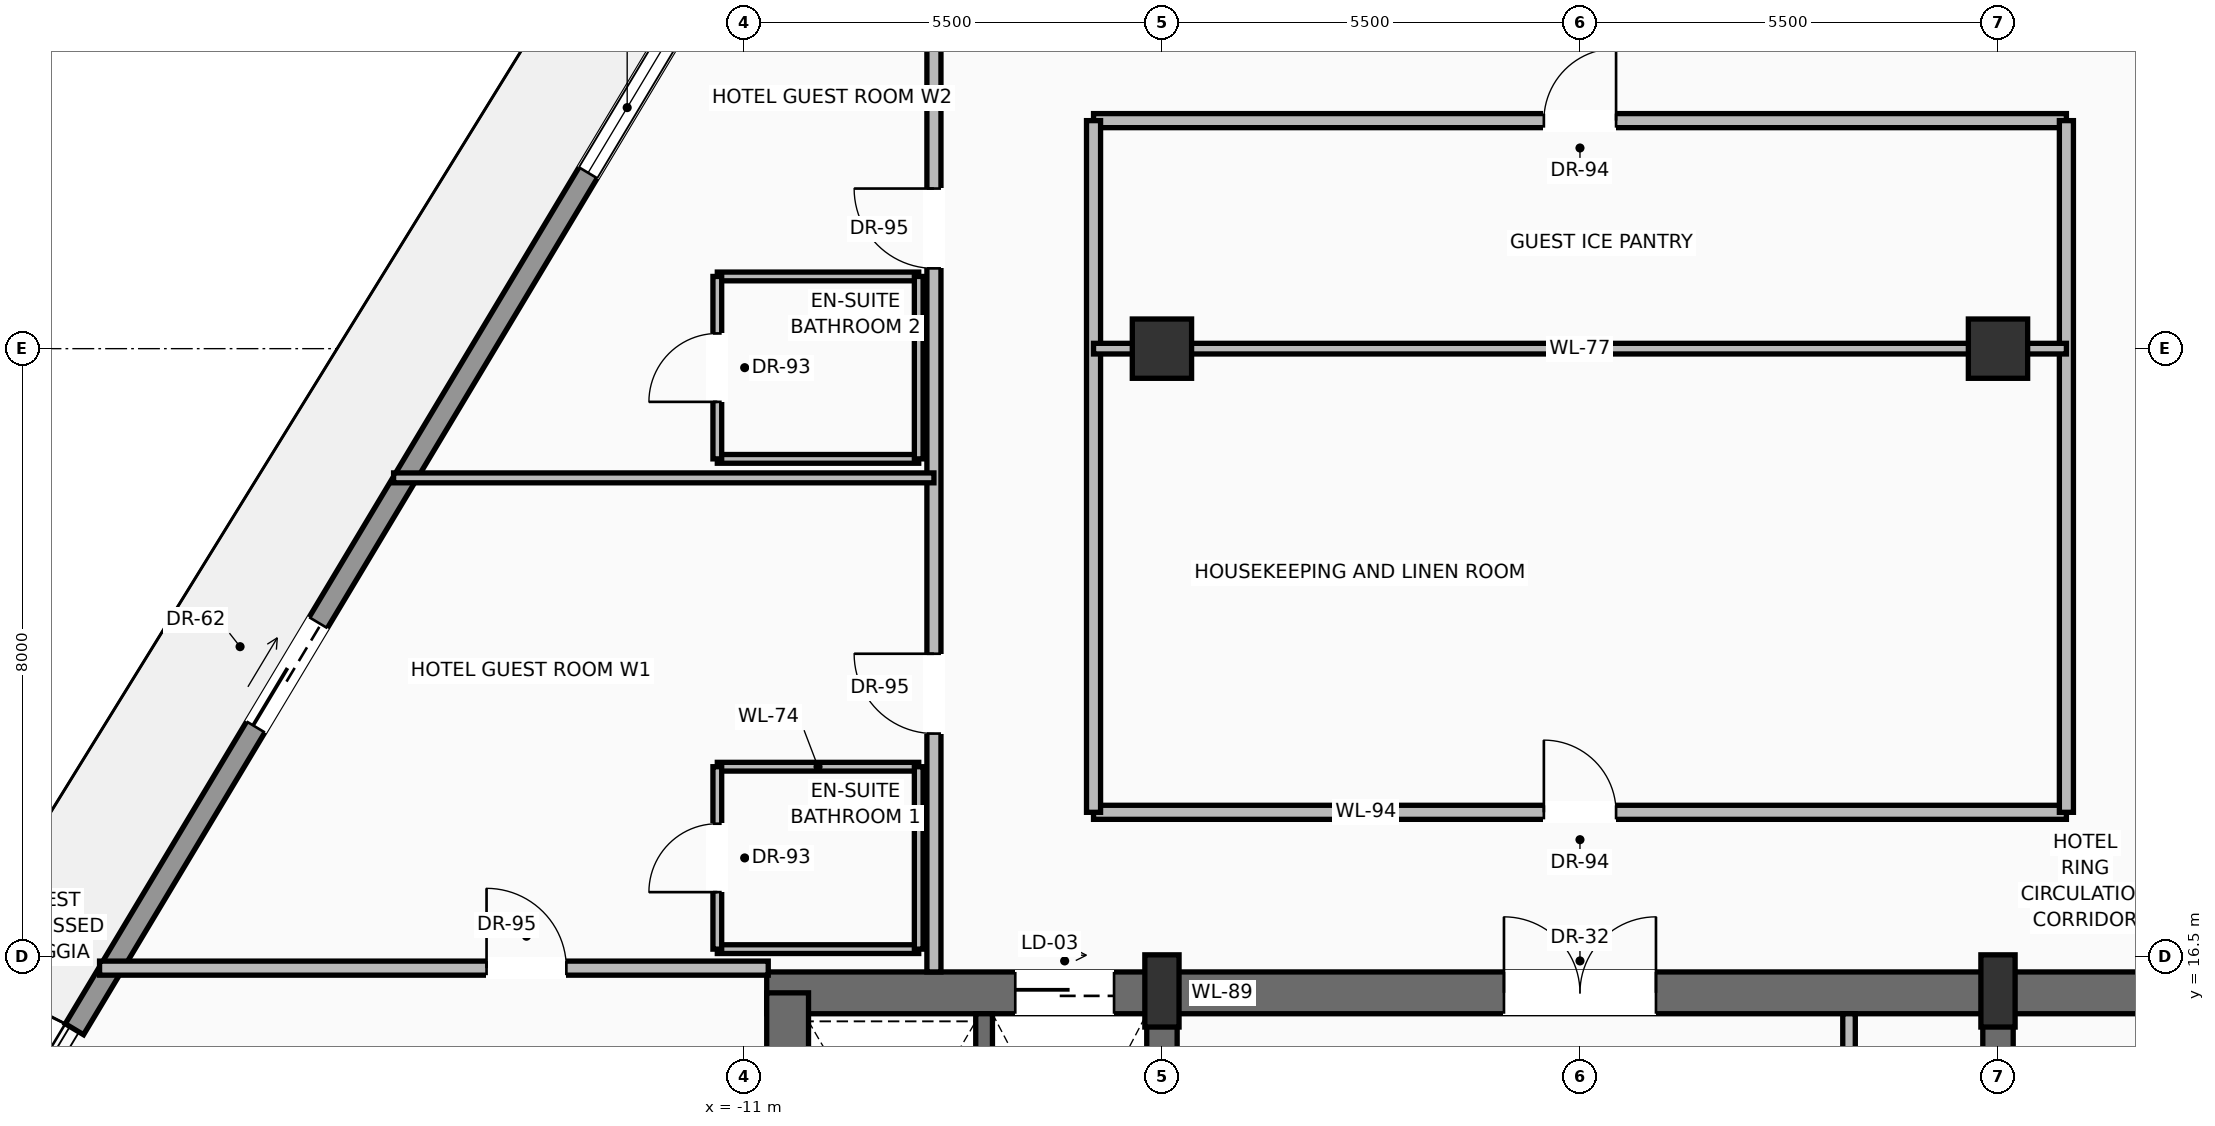
"""IFC4 building model, lengths in metres.
Left out: names, types, materials, properties, quantities, classifications, styles, units other than length and angle.
Written with IfcOpenShell. Run it as: python <this file> out.ifc"""

import sys

from ifc_helpers import new_model, si_unit, direction, frame, frame_2d, origin, origin_2d, place, context, subcontext, project, spatial, rectangle, extrude, source, transform, mapped, element, fill, save


model = new_model("IFC4")
c1 = context("Model", 3, precision=1e-05, world=origin(), true_north=direction((0.0, 1.0)))
c2 = subcontext(c1, "Body", "Model", "MODEL_VIEW")
j1 = project(units=[si_unit("LENGTHUNIT", "METRE"), si_unit("PLANEANGLEUNIT", "RADIAN")], contexts=[c1])
p1 = place(None, origin())
s1 = spatial("IfcSite", under=j1, at=p1, CompositionType="ELEMENT")
p2 = place(p1, origin())
s2 = spatial("IfcBuilding", under=s1, at=p2, CompositionType="ELEMENT")
p3 = place(p2, frame((0.0, 0.0, 220.0)))
s3 = spatial("IfcBuildingStorey", under=s2, at=p3, CompositionType="ELEMENT", Elevation=220.0)
p4 = place(p3, frame((-10.7, 16.025, 0.0), z_axis=(0.0, 0.0, 1.0), x_axis=(1.0, 0.0, 0.0)))
e1 = element("IfcWall", 1, at=p4, inside=s3, PredefinedType="SHEAR", context=c2, shape_type="SweptSolid", body=[
    extrude(rectangle(XDim=21.4, YDim=0.55, at=frame_2d((10.7, 0.0))), origin(), (0.0, 0.0, 1.0), 3.24),
])
p5 = place(p4, frame((3.27, 0.0, 0.0)))
e2 = element("IfcOpeningElement", 2, at=p5, cuts=e1, PredefinedType="OPENING", context=c2, shape_type="SweptSolid", body=[
    extrude(rectangle(XDim=1.3, YDim=2.3, at=frame_2d((0.65, 1.15))), frame((0.0, 0.285, 0.0), z_axis=(0.0, -1.0, 0.0), x_axis=(1.0, 0.0, 0.0)), (0.0, 0.0, 1.0), 0.57),
])
p6 = place(p4, frame((9.7, 0.0, 0.0)))
e3 = element("IfcOpeningElement", 3, at=p6, cuts=e1, PredefinedType="OPENING", context=c2, shape_type="SweptSolid", body=[
    extrude(rectangle(XDim=2.0, YDim=2.4, at=frame_2d((1.0, 1.2))), frame((0.0, 0.285, 0.0), z_axis=(0.0, -1.0, 0.0), x_axis=(1.0, 0.0, 0.0)), (0.0, 0.0, 1.0), 0.57),
])
p7 = place(p3, frame((-10.425, 0.575, 0.0), z_axis=(0.0, 0.0, 1.0), x_axis=(0.0, 1.0, 0.0)))
e4 = element("IfcWall", 4, at=p7, inside=s3, PredefinedType="SHEAR", context=c2, shape_type="SweptSolid", body=[
    extrude(rectangle(XDim=15.45, YDim=0.55, at=frame_2d((7.725, 0.0))), origin(), (0.0, 0.0, 1.0), 3.24),
])
p8 = place(p3, frame((-5.5, 0.575, 0.0), z_axis=(0.0, 0.0, 1.0), x_axis=(0.0, 1.0, 0.0)))
e5 = element("IfcWall", 5, at=p8, inside=s3, PredefinedType="SHEAR", context=c2, shape_type="SweptSolid", body=[
    extrude(rectangle(XDim=15.45, YDim=0.4, at=frame_2d((7.725, 0.0))), origin(), (0.0, 0.0, 1.0), 3.24),
])
p9 = place(p8, frame((8.925, 0.0, 0.0)))
e6 = element("IfcOpeningElement", 6, at=p9, cuts=e5, PredefinedType="OPENING", context=c2, shape_type="SweptSolid", body=[
    extrude(rectangle(XDim=1.1, YDim=2.2, at=frame_2d((0.55, 1.1))), frame((0.0, 0.21, 0.0), z_axis=(0.0, -1.0, 0.0), x_axis=(1.0, 0.0, 0.0)), (0.0, 0.0, 1.0), 0.42),
])
p10 = place(p3, frame((5.5, 0.575, 0.0), z_axis=(0.0, 0.0, 1.0), x_axis=(0.0, 1.0, 0.0)))
e7 = element("IfcWall", 7, at=p10, inside=s3, PredefinedType="SHEAR", context=c2, shape_type="SweptSolid", body=[
    extrude(rectangle(XDim=15.45, YDim=0.4, at=frame_2d((7.725, 0.0))), origin(), (0.0, 0.0, 1.0), 3.24),
])
p11 = place(p10, frame((8.925, 0.0, 0.0)))
e8 = element("IfcOpeningElement", 8, at=p11, cuts=e7, PredefinedType="OPENING", context=c2, shape_type="SweptSolid", body=[
    extrude(rectangle(XDim=1.1, YDim=2.2, at=frame_2d((0.55, 1.1))), frame((0.0, 0.21, 0.0), z_axis=(0.0, -1.0, 0.0), x_axis=(1.0, 0.0, 0.0)), (0.0, 0.0, 1.0), 0.42),
])
m1 = source(origin(), c2, "Body", "SweptSolid", [
    extrude(rectangle(XDim=0.45, YDim=0.95, at=origin_2d()), origin(), (0.0, 0.0, 1.0), 3.45),
])
for number, where, z_axis, x_axis in (
    (9, (-5.5, 16.05, 0.0), (0.0, 0.0, 1.0), (1.0, 0.0, 0.0)),
    (10, (5.5, 16.05, 0.0), (0.0, 0.0, 1.0), (1.0, 0.0, 0.0)),
):
    element("IfcColumn", number, at=place(p3, frame(where, z_axis=z_axis, x_axis=x_axis)), inside=s3, PredefinedType="PILASTER", context=c2, shape_type="MappedRepresentation", body=[
        mapped(m1, transform((0.0, 0.0, 0.0), scale=1.0)),
    ])
m2 = source(origin(), c2, "Body", "SweptSolid", [
    extrude(rectangle(XDim=0.78, YDim=0.78, at=origin_2d()), origin(), (0.0, 0.0, 1.0), 3.45),
])
for number, where, z_axis, x_axis in (
    (11, (-5.5, 24.5, 0.0), (0.0, 0.0, 1.0), (1.0, 0.0, 0.0)),
    (12, (5.5, 24.5, 0.0), (0.0, 0.0, 1.0), (1.0, 0.0, 0.0)),
):
    element("IfcColumn", number, at=place(p3, frame(where, z_axis=z_axis, x_axis=x_axis)), inside=s3, PredefinedType="COLUMN", context=c2, shape_type="MappedRepresentation", body=[
        mapped(m2, transform((0.0, 0.0, 0.0), scale=1.0)),
    ])
p12 = place(p3, frame((-19.808, 15.546, 0.0), z_axis=(0.0, 0.0, 1.0), x_axis=(0.514354531287, 0.857577644382, 0.0)))
e13 = element("IfcWall", 13, at=p12, inside=s3, PredefinedType="SOLIDWALL", context=c2, shape_type="SweptSolid", body=[
    extrude(rectangle(XDim=19.322, YDim=0.28, at=frame_2d((9.661, 0.0))), origin(), (0.0, 0.0, 1.0), 2.82),
])
p13 = place(p12, frame((4.637, 0.0, 0.0)))
e14 = element("IfcOpeningElement", 14, at=p13, cuts=e13, PredefinedType="OPENING", context=c2, shape_type="SweptSolid", body=[
    extrude(rectangle(XDim=1.6, YDim=2.35, at=frame_2d((0.8, 1.175))), frame((0.0, 0.15, 0.0), z_axis=(0.0, -1.0, 0.0), x_axis=(1.0, 0.0, 0.0)), (0.0, 0.0, 1.0), 0.3),
])
p14 = place(p12, frame((13.139, 0.0, 0.9)))
e15 = element("IfcOpeningElement", 15, at=p14, cuts=e13, PredefinedType="OPENING", context=c2, shape_type="SweptSolid", body=[
    extrude(rectangle(XDim=2.0, YDim=1.75, at=frame_2d((1.0, 0.875))), frame((0.0, 0.15, 0.0), z_axis=(0.0, -1.0, 0.0), x_axis=(1.0, 0.0, 0.0)), (0.0, 0.0, 1.0), 0.3),
])
p15 = place(p3, frame((-7.84, 11.87, 0.0), z_axis=(0.0, 0.0, 1.0), x_axis=(0.0, 1.0, 0.0)))
e16 = element("IfcWall", 16, at=p15, inside=s3, PredefinedType="SOLIDWALL", context=c2, shape_type="SweptSolid", body=[
    extrude(rectangle(XDim=3.88, YDim=0.22, at=frame_2d((1.94, 0.0))), origin(), (0.0, 0.0, 1.0), 3.24),
])
p16 = place(p3, frame((3.54, 11.22, 0.0), z_axis=(0.0, 0.0, 1.0), x_axis=(0.0, 1.0, 0.0)))
e17 = element("IfcWall", 17, at=p16, inside=s3, PredefinedType="PARTITIONING", context=c2, shape_type="SweptSolid", body=[
    extrude(rectangle(XDim=4.53, YDim=0.165, at=frame_2d((2.265, 0.0))), origin(), (0.0, 0.0, 1.0), 3.232),
])
p17 = place(p16, frame((1.25, 0.0, 0.0)))
e18 = element("IfcOpeningElement", 18, at=p17, cuts=e17, PredefinedType="OPENING", context=c2, shape_type="SweptSolid", body=[
    extrude(rectangle(XDim=0.9, YDim=2.1, at=frame_2d((0.45, 1.05))), frame((0.0, 0.093, 0.0), z_axis=(0.0, -1.0, 0.0), x_axis=(1.0, 0.0, 0.0)), (0.0, 0.0, 1.0), 0.185),
])
p18 = place(p3, frame((-6.4, 18.4, 0.0), z_axis=(0.0, 0.0, 1.0), x_axis=(1.0, 0.0, 0.0)))
e19 = element("IfcWall", 19, at=p18, inside=s3, PredefinedType="PARTITIONING", context=c2, shape_type="SweptSolid", body=[
    extrude(rectangle(XDim=12.8, YDim=0.185, at=frame_2d((6.4, 0.0))), origin(), (0.0, 0.0, 1.0), 3.232),
])
p19 = place(p18, frame((5.925, 0.0, 0.0)))
e20 = element("IfcOpeningElement", 20, at=p19, cuts=e19, PredefinedType="OPENING", context=c2, shape_type="SweptSolid", body=[
    extrude(rectangle(XDim=0.95, YDim=2.2, at=frame_2d((0.475, 1.1))), frame((0.0, 0.103, 0.0), z_axis=(0.0, -1.0, 0.0), x_axis=(1.0, 0.0, 0.0)), (0.0, 0.0, 1.0), 0.205),
])
p20 = place(p3, frame((-6.4, 27.5, 0.0), z_axis=(0.0, 0.0, 1.0), x_axis=(1.0, 0.0, 0.0)))
e21 = element("IfcWall", 21, at=p20, inside=s3, PredefinedType="PARTITIONING", context=c2, shape_type="SweptSolid", body=[
    extrude(rectangle(XDim=12.8, YDim=0.185, at=frame_2d((6.4, 0.0))), origin(), (0.0, 0.0, 1.0), 3.232),
])
p21 = place(p20, frame((5.925, 0.0, 0.0)))
e22 = element("IfcOpeningElement", 22, at=p21, cuts=e21, PredefinedType="OPENING", context=c2, shape_type="SweptSolid", body=[
    extrude(rectangle(XDim=0.95, YDim=2.2, at=frame_2d((0.475, 1.1))), frame((0.0, 0.103, 0.0), z_axis=(0.0, -1.0, 0.0), x_axis=(1.0, 0.0, 0.0)), (0.0, 0.0, 1.0), 0.205),
])
for number, where, z_axis, x_axis in (
    (23, (-6.4, 18.4, 0.0), (0.0, 0.0, 1.0), (0.0, 1.0, 0.0)),
    (24, (6.4, 18.4, 0.0), (0.0, 0.0, 1.0), (0.0, 1.0, 0.0)),
):
    element("IfcWall", number, at=place(p3, frame(where, z_axis=z_axis, x_axis=x_axis)), inside=s3, PredefinedType="PARTITIONING", context=c2, shape_type="SweptSolid", body=[
        extrude(rectangle(XDim=9.1, YDim=0.185, at=frame_2d((4.55, 0.0))), origin(), (0.0, 0.0, 1.0), 3.232),
    ])
p22 = place(p3, frame((-8.5, 16.3, 0.0), z_axis=(0.0, 0.0, 1.0), x_axis=(0.0, 1.0, 0.0)))
e25 = element("IfcWall", 25, at=p22, inside=s3, PredefinedType="PARTITIONING", context=c2, shape_type="SweptSolid", body=[
    extrude(rectangle(XDim=13.3, YDim=0.185, at=frame_2d((6.65, 0.0))), origin(), (0.0, 0.0, 1.0), 3.232),
])
p23 = place(p22, frame((3.136, 0.0, 0.0)))
e26 = element("IfcOpeningElement", 26, at=p23, cuts=e25, PredefinedType="OPENING", context=c2, shape_type="SweptSolid", body=[
    extrude(rectangle(XDim=1.05, YDim=2.25, at=frame_2d((0.525, 1.125))), frame((0.0, 0.103, 0.0), z_axis=(0.0, -1.0, 0.0), x_axis=(1.0, 0.0, 0.0)), (0.0, 0.0, 1.0), 0.205),
])
p24 = place(p22, frame((9.256, 0.0, 0.0)))
e27 = element("IfcOpeningElement", 27, at=p24, cuts=e25, PredefinedType="OPENING", context=c2, shape_type="SweptSolid", body=[
    extrude(rectangle(XDim=1.05, YDim=2.25, at=frame_2d((0.525, 1.125))), frame((0.0, 0.103, 0.0), z_axis=(0.0, -1.0, 0.0), x_axis=(1.0, 0.0, 0.0)), (0.0, 0.0, 1.0), 0.205),
])
p25 = place(p3, frame((-6.4, 24.5, 0.0), z_axis=(0.0, 0.0, 1.0), x_axis=(1.0, 0.0, 0.0)))
e28 = element("IfcWall", 28, at=p25, inside=s3, PredefinedType="PARTITIONING", context=c2, shape_type="SweptSolid", body=[
    extrude(rectangle(XDim=12.8, YDim=0.14, at=frame_2d((6.4, 0.0))), origin(), (0.0, 0.0, 1.0), 2.683),
])
p26 = place(p3, frame((-19.478, 16.35, 0.0), z_axis=(0.0, 0.0, 1.0), x_axis=(1.0, 0.0, 0.0)))
e29 = element("IfcWall", 29, at=p26, inside=s3, PredefinedType="PARTITIONING", context=c2, shape_type="SweptSolid", body=[
    extrude(rectangle(XDim=8.798, YDim=0.185, at=frame_2d((4.399, 0.0))), origin(), (0.0, 0.0, 1.0), 3.232),
])
p27 = place(p26, frame((5.092, 0.0, 0.0)))
e30 = element("IfcOpeningElement", 30, at=p27, cuts=e29, PredefinedType="OPENING", context=c2, shape_type="SweptSolid", body=[
    extrude(rectangle(XDim=1.05, YDim=2.25, at=frame_2d((0.525, 1.125))), frame((0.0, 0.103, 0.0), z_axis=(0.0, -1.0, 0.0), x_axis=(1.0, 0.0, 0.0)), (0.0, 0.0, 1.0), 0.205),
])
for number, where, z_axis, x_axis in (
    (31, (-11.35, 16.6, 0.0), (0.0, 0.0, 1.0), (1.0, 0.0, 0.0)),
    (32, (-11.35, 19.0, 0.0), (0.0, 0.0, 1.0), (1.0, 0.0, 0.0)),
):
    element("IfcWall", number, at=place(p3, frame(where, z_axis=z_axis, x_axis=x_axis)), inside=s3, PredefinedType="PARTITIONING", context=c2, shape_type="SweptSolid", body=[
        extrude(rectangle(XDim=2.65, YDim=0.115, at=frame_2d((1.325, 0.0))), origin(), (0.0, 0.0, 1.0), 3.232),
    ])
p28 = place(p3, frame((-11.35, 16.6, 0.0), z_axis=(0.0, 0.0, 1.0), x_axis=(0.0, 1.0, 0.0)))
e33 = element("IfcWall", 33, at=p28, inside=s3, PredefinedType="PARTITIONING", context=c2, shape_type="SweptSolid", body=[
    extrude(rectangle(XDim=2.4, YDim=0.115, at=frame_2d((1.2, 0.0))), origin(), (0.0, 0.0, 1.0), 3.232),
])
p29 = place(p28, frame((0.75, 0.0, 0.0)))
e34 = element("IfcOpeningElement", 34, at=p29, cuts=e33, PredefinedType="OPENING", context=c2, shape_type="SweptSolid", body=[
    extrude(rectangle(XDim=0.9, YDim=2.15, at=frame_2d((0.45, 1.075))), frame((0.0, 0.067, 0.0), z_axis=(0.0, -1.0, 0.0), x_axis=(1.0, 0.0, 0.0)), (0.0, 0.0, 1.0), 0.135),
])
p30 = place(p3, frame((-8.7, 16.6, 0.0), z_axis=(0.0, 0.0, 1.0), x_axis=(0.0, 1.0, 0.0)))
e35 = element("IfcWall", 35, at=p30, inside=s3, PredefinedType="PARTITIONING", context=c2, shape_type="SweptSolid", body=[
    extrude(rectangle(XDim=2.4, YDim=0.115, at=frame_2d((1.2, 0.0))), origin(), (0.0, 0.0, 1.0), 3.232),
])
p31 = place(p3, frame((-15.609, 22.8, 0.0), z_axis=(0.0, 0.0, 1.0), x_axis=(1.0, 0.0, 0.0)))
e36 = element("IfcWall", 36, at=p31, inside=s3, PredefinedType="PARTITIONING", context=c2, shape_type="SweptSolid", body=[
    extrude(rectangle(XDim=7.109, YDim=0.13, at=frame_2d((3.555, 0.0))), origin(), (0.0, 0.0, 1.0), 3.232),
])
for number, where, z_axis, x_axis in (
    (37, (-11.35, 23.05, 0.0), (0.0, 0.0, 1.0), (1.0, 0.0, 0.0)),
    (38, (-11.35, 25.45, 0.0), (0.0, 0.0, 1.0), (1.0, 0.0, 0.0)),
):
    element("IfcWall", number, at=place(p3, frame(where, z_axis=z_axis, x_axis=x_axis)), inside=s3, PredefinedType="PARTITIONING", context=c2, shape_type="SweptSolid", body=[
        extrude(rectangle(XDim=2.65, YDim=0.115, at=frame_2d((1.325, 0.0))), origin(), (0.0, 0.0, 1.0), 3.232),
    ])
p32 = place(p3, frame((-11.35, 23.05, 0.0), z_axis=(0.0, 0.0, 1.0), x_axis=(0.0, 1.0, 0.0)))
e39 = element("IfcWall", 39, at=p32, inside=s3, PredefinedType="PARTITIONING", context=c2, shape_type="SweptSolid", body=[
    extrude(rectangle(XDim=2.4, YDim=0.115, at=frame_2d((1.2, 0.0))), origin(), (0.0, 0.0, 1.0), 3.232),
])
p33 = place(p32, frame((0.75, 0.0, 0.0)))
e40 = element("IfcOpeningElement", 40, at=p33, cuts=e39, PredefinedType="OPENING", context=c2, shape_type="SweptSolid", body=[
    extrude(rectangle(XDim=0.9, YDim=2.15, at=frame_2d((0.45, 1.075))), frame((0.0, 0.067, 0.0), z_axis=(0.0, -1.0, 0.0), x_axis=(1.0, 0.0, 0.0)), (0.0, 0.0, 1.0), 0.135),
])
p34 = place(p3, frame((-8.7, 23.05, 0.0), z_axis=(0.0, 0.0, 1.0), x_axis=(0.0, 1.0, 0.0)))
e41 = element("IfcWall", 41, at=p34, inside=s3, PredefinedType="PARTITIONING", context=c2, shape_type="SweptSolid", body=[
    extrude(rectangle(XDim=2.4, YDim=0.115, at=frame_2d((1.2, 0.0))), origin(), (0.0, 0.0, 1.0), 3.232),
])
m3 = source(origin(), c2, "Body", "SweptSolid", [
    extrude(rectangle(XDim=1.6, YDim=2.35, at=frame_2d((0.8, 1.175))), frame((0.0, 0.025, 0.0), z_axis=(0.0, -1.0, 0.0), x_axis=(1.0, 0.0, 0.0)), (0.0, 0.0, 1.0), 0.05),
])
p35 = place(p13, origin())
e42 = element("IfcDoor", 42, at=p35, inside=s3, OperationType="SLIDING_TO_LEFT", PredefinedType="DOOR", context=c2, shape_type="MappedRepresentation", body=[
    mapped(m3, transform((0.0, 0.0, 0.0), scale=1.0)),
])
fill(e14, e42)
m4 = source(origin(), c2, "Body", "SweptSolid", [
    extrude(rectangle(XDim=2.0, YDim=1.75, at=frame_2d((1.0, 0.875))), frame((0.0, 0.03, 0.0), z_axis=(0.0, -1.0, 0.0), x_axis=(1.0, 0.0, 0.0)), (0.0, 0.0, 1.0), 0.06),
])
p36 = place(p14, origin())
e43 = element("IfcWindow", 43, at=p36, inside=s3, PartitioningType="SINGLE_PANEL", PredefinedType="WINDOW", context=c2, shape_type="MappedRepresentation", body=[
    mapped(m4, transform((0.0, 0.0, 0.0), scale=1.0)),
])
fill(e15, e43)
m5 = source(origin(), c2, "Body", "SweptSolid", [
    extrude(rectangle(XDim=1.3, YDim=2.3, at=frame_2d((0.65, 1.15))), frame((0.0, 0.025, 0.0), z_axis=(0.0, -1.0, 0.0), x_axis=(1.0, 0.0, 0.0)), (0.0, 0.0, 1.0), 0.05),
])
p37 = place(p5, origin())
e44 = element("IfcDoor", 44, at=p37, inside=s3, OperationType="SLIDING_TO_RIGHT", PredefinedType="DOOR", context=c2, shape_type="MappedRepresentation", body=[
    mapped(m5, transform((0.0, 0.0, 0.0), scale=1.0)),
])
fill(e2, e44)
m6 = source(origin(), c2, "Body", "SweptSolid", [
    extrude(rectangle(XDim=2.0, YDim=2.4, at=frame_2d((1.0, 1.2))), frame((0.0, 0.025, 0.0), z_axis=(0.0, -1.0, 0.0), x_axis=(1.0, 0.0, 0.0)), (0.0, 0.0, 1.0), 0.05),
])
p38 = place(p6, origin())
e45 = element("IfcDoor", 45, at=p38, inside=s3, OperationType="DOUBLE_DOOR_SINGLE_SWING", PredefinedType="DOOR", context=c2, shape_type="MappedRepresentation", body=[
    mapped(m6, transform((0.0, 0.0, 0.0), scale=1.0)),
])
fill(e3, e45)
m7 = source(origin(), c2, "Body", "SweptSolid", [
    extrude(rectangle(XDim=0.95, YDim=2.2, at=frame_2d((0.475, 1.1))), frame((0.0, 0.025, 0.0), z_axis=(0.0, -1.0, 0.0), x_axis=(1.0, 0.0, 0.0)), (0.0, 0.0, 1.0), 0.05),
])
p39 = place(p19, origin())
e46 = element("IfcDoor", 46, at=p39, inside=s3, OperationType="SINGLE_SWING_LEFT", PredefinedType="DOOR", context=c2, shape_type="MappedRepresentation", body=[
    mapped(m7, transform((0.0, 0.0, 0.0), scale=1.0)),
])
fill(e20, e46)
p40 = place(p21, origin())
e47 = element("IfcDoor", 47, at=p40, inside=s3, OperationType="SINGLE_SWING_RIGHT", PredefinedType="DOOR", context=c2, shape_type="MappedRepresentation", body=[
    mapped(m7, transform((0.0, 0.0, 0.0), scale=1.0)),
])
fill(e22, e47)
m8 = source(origin(), c2, "Body", "SweptSolid", [
    extrude(rectangle(XDim=1.05, YDim=2.25, at=frame_2d((0.525, 1.125))), frame((0.0, 0.025, 0.0), z_axis=(0.0, -1.0, 0.0), x_axis=(1.0, 0.0, 0.0)), (0.0, 0.0, 1.0), 0.05),
])
p41 = place(p27, origin())
e48 = element("IfcDoor", 48, at=p41, inside=s3, OperationType="SINGLE_SWING_LEFT", PredefinedType="DOOR", context=c2, shape_type="MappedRepresentation", body=[
    mapped(m8, transform((0.0, 0.0, 0.0), scale=1.0)),
])
fill(e30, e48)
p42 = place(p23, origin())
e49 = element("IfcDoor", 49, at=p42, inside=s3, OperationType="SINGLE_SWING_RIGHT", PredefinedType="DOOR", context=c2, shape_type="MappedRepresentation", body=[
    mapped(m8, transform((0.0, 0.0, 0.0), scale=1.0)),
])
fill(e26, e49)
m9 = source(origin(), c2, "Body", "SweptSolid", [
    extrude(rectangle(XDim=0.9, YDim=2.15, at=frame_2d((0.45, 1.075))), frame((0.0, 0.025, 0.0), z_axis=(0.0, -1.0, 0.0), x_axis=(1.0, 0.0, 0.0)), (0.0, 0.0, 1.0), 0.05),
])
p43 = place(p29, origin())
e50 = element("IfcDoor", 50, at=p43, inside=s3, OperationType="SINGLE_SWING_LEFT", PredefinedType="DOOR", context=c2, shape_type="MappedRepresentation", body=[
    mapped(m9, transform((0.0, 0.0, 0.0), scale=1.0)),
])
fill(e34, e50)
p44 = place(p24, origin())
e51 = element("IfcDoor", 51, at=p44, inside=s3, OperationType="SINGLE_SWING_RIGHT", PredefinedType="DOOR", context=c2, shape_type="MappedRepresentation", body=[
    mapped(m8, transform((0.0, 0.0, 0.0), scale=1.0)),
])
fill(e27, e51)
p45 = place(p33, origin())
e52 = element("IfcDoor", 52, at=p45, inside=s3, OperationType="SINGLE_SWING_LEFT", PredefinedType="DOOR", context=c2, shape_type="MappedRepresentation", body=[
    mapped(m9, transform((0.0, 0.0, 0.0), scale=1.0)),
])
fill(e40, e52)
save(model, sys.argv[1])
